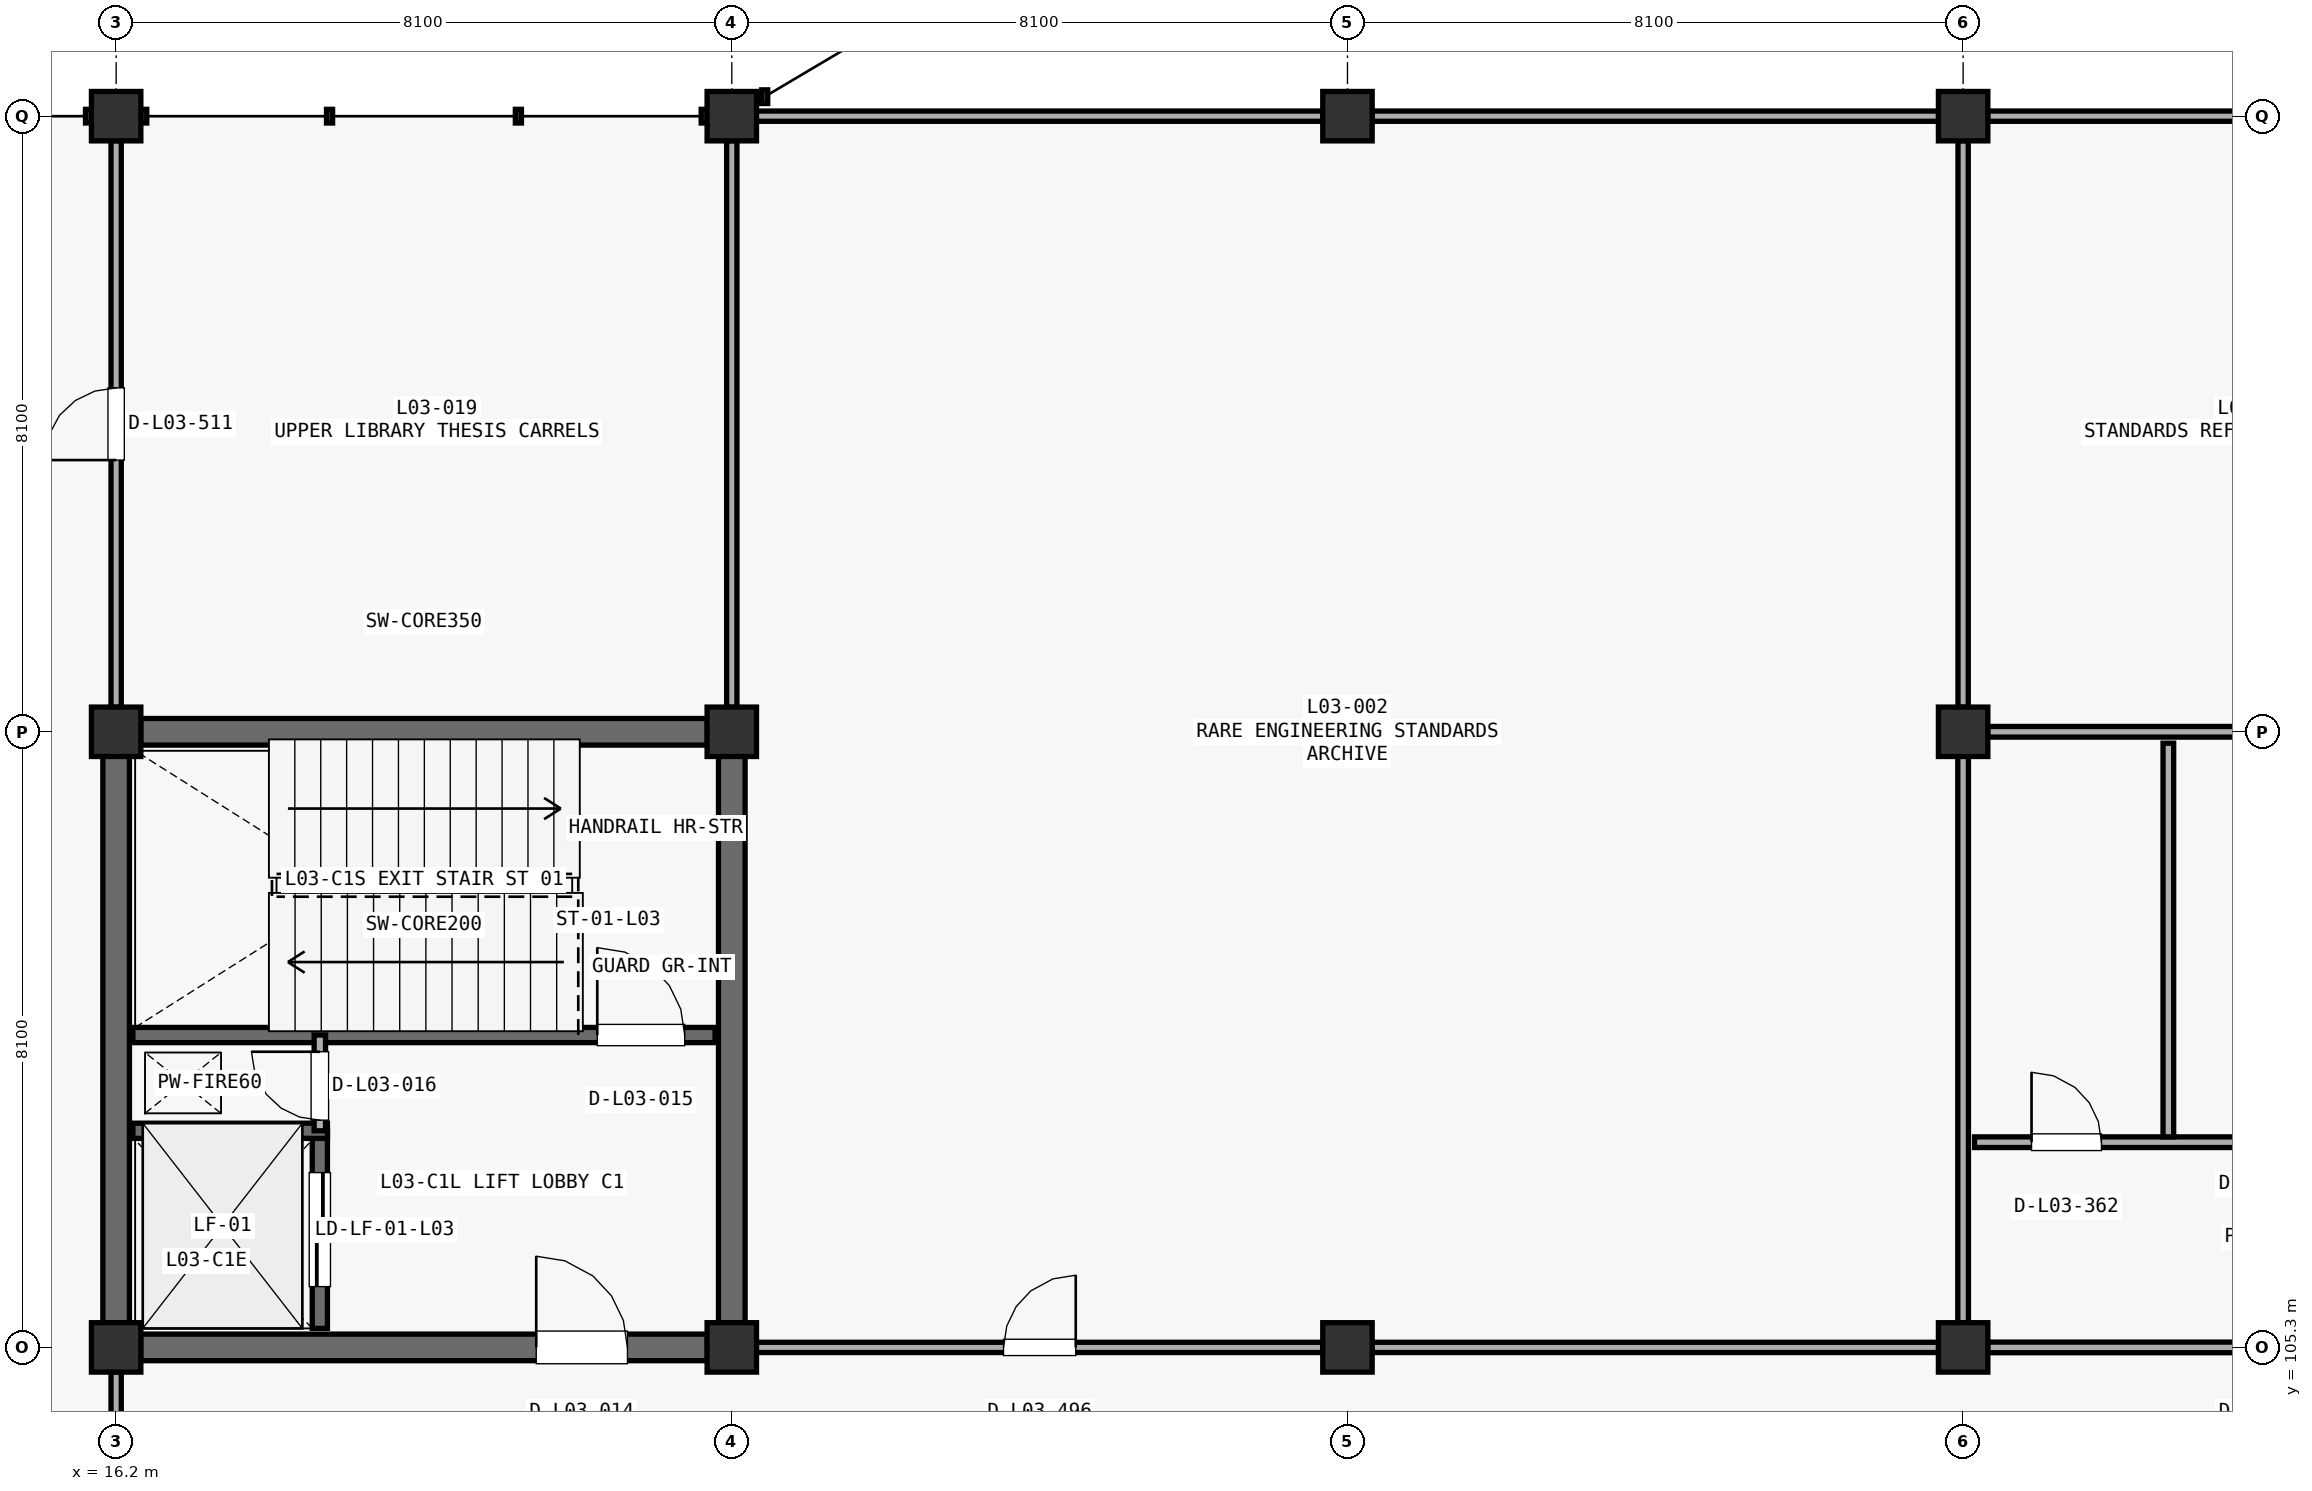
"""IFC4 building model, lengths in metres.
Left out: names, types, materials, properties, quantities, classifications, styles, units other than length and angle.
Written with IfcOpenShell. Run it as: python <this file> out.ifc"""

import sys

from ifc_helpers import new_model, si_unit, direction, frame, frame_2d, origin, origin_2d, place, context, subcontext, project, spatial, rectangle, extrude, element, fill, save


model = new_model("IFC4")
c1 = context("Model", 3, precision=1e-05, world=origin(), true_north=direction((0.0, 1.0)))
c2 = subcontext(c1, "Body", "Model", "MODEL_VIEW")
j1 = project(units=[si_unit("LENGTHUNIT", "METRE"), si_unit("PLANEANGLEUNIT", "RADIAN")], contexts=[c1])
p1 = place(None, origin())
s1 = spatial("IfcSite", under=j1, at=p1, CompositionType="ELEMENT")
p2 = place(p1, origin())
s2 = spatial("IfcBuilding", under=s1, at=p2, CompositionType="ELEMENT")
p3 = place(p2, frame((0.0, 0.0, 14.11)))
s3 = spatial("IfcBuildingStorey", under=s2, at=p3, CompositionType="ELEMENT", Elevation=14.11)
for number, where, z_axis, x_axis in (
    (1, (16.2, 105.3, 0.0), (0.0, 0.0, 1.0), (1.0, 0.0, 0.0)),
    (2, (16.2, 113.4, 0.0), (0.0, 0.0, 1.0), (1.0, 0.0, 0.0)),
    (3, (16.2, 121.5, 0.0), (0.0, 0.0, 1.0), (1.0, 0.0, 0.0)),
    (4, (24.3, 105.3, 0.0), (0.0, 0.0, 1.0), (1.0, 0.0, 0.0)),
    (5, (24.3, 113.4, 0.0), (0.0, 0.0, 1.0), (1.0, 0.0, 0.0)),
    (6, (24.3, 121.5, 0.0), (0.0, 0.0, 1.0), (1.0, 0.0, 0.0)),
    (7, (32.4, 105.3, 0.0), (0.0, 0.0, 1.0), (1.0, 0.0, 0.0)),
    (8, (32.4, 113.4, 0.0), (0.0, 0.0, 1.0), (1.0, 0.0, 0.0)),
    (9, (32.4, 121.5, 0.0), (0.0, 0.0, 1.0), (1.0, 0.0, 0.0)),
    (10, (40.5, 105.3, 0.0), (0.0, 0.0, 1.0), (1.0, 0.0, 0.0)),
    (11, (40.5, 113.4, 0.0), (0.0, 0.0, 1.0), (1.0, 0.0, 0.0)),
    (12, (40.5, 121.5, 0.0), (0.0, 0.0, 1.0), (1.0, 0.0, 0.0)),
):
    element("IfcColumn", number, at=place(p3, frame(where, z_axis=z_axis, x_axis=x_axis)), inside=s3, PredefinedType="COLUMN", context=c2, shape_type="SweptSolid", body=[
        extrude(rectangle(XDim=0.65, YDim=0.65, at=origin_2d()), origin(), (0.0, 0.0, 1.0), 4.42),
    ])
p4 = place(p3, frame((16.523, 113.4, 0.0), z_axis=(0.0, 0.0, 1.0), x_axis=(1.0, 0.0, 0.0)))
e13 = element("IfcWall", 13, at=p4, inside=s3, PredefinedType="SHEAR", context=c2, shape_type="SweptSolid", body=[
    extrude(rectangle(XDim=7.454, YDim=0.35, at=frame_2d((3.727, 0.0))), origin(), (0.0, 0.0, 1.0), 4.162),
])
for number, where, z_axis, x_axis in (
    (14, (16.2, 105.623, 0.0), (0.0, 0.0, 1.0), (0.0, 1.0, 0.0)),
    (15, (24.3, 105.623, 0.0), (0.0, 0.0, 1.0), (0.0, 1.0, 0.0)),
):
    element("IfcWall", number, at=place(p3, frame(where, z_axis=z_axis, x_axis=x_axis)), inside=s3, PredefinedType="SHEAR", context=c2, shape_type="SweptSolid", body=[
        extrude(rectangle(XDim=7.454, YDim=0.35, at=frame_2d((3.727, 0.0))), origin(), (0.0, 0.0, 1.0), 4.162),
    ])
p5 = place(p3, frame((16.523, 105.3, 0.0), z_axis=(0.0, 0.0, 1.0), x_axis=(1.0, 0.0, 0.0)))
e16 = element("IfcWall", 16, at=p5, inside=s3, PredefinedType="SHEAR", context=c2, shape_type="SweptSolid", body=[
    extrude(rectangle(XDim=7.454, YDim=0.35, at=frame_2d((3.727, 0.0))), origin(), (0.0, 0.0, 1.0), 4.162),
])
p6 = place(p5, frame((5.204, 0.0, 0.0)))
e17 = element("IfcOpeningElement", 17, at=p6, cuts=e16, PredefinedType="OPENING", context=c2, shape_type="SweptSolid", body=[
    extrude(rectangle(XDim=1.2, YDim=2.2, at=frame_2d((0.6, 1.1))), frame((0.0, 0.185, 0.0), z_axis=(0.0, -1.0, 0.0), x_axis=(1.0, 0.0, 0.0)), (0.0, 0.0, 1.0), 0.37),
])
p7 = place(p3, frame((16.42, 109.41, 0.0), z_axis=(0.0, 0.0, 1.0), x_axis=(1.0, 0.0, 0.0)))
e18 = element("IfcWall", 18, at=p7, inside=s3, PredefinedType="SHEAR", context=c2, shape_type="SweptSolid", body=[
    extrude(rectangle(XDim=7.66, YDim=0.2, at=frame_2d((3.83, 0.0))), origin(), (0.0, 0.0, 1.0), 4.162),
])
p8 = place(p7, frame((6.11, 0.0, 0.0)))
e19 = element("IfcOpeningElement", 19, at=p8, cuts=e18, PredefinedType="OPENING", context=c2, shape_type="SweptSolid", body=[
    extrude(rectangle(XDim=1.15, YDim=2.2, at=frame_2d((0.575, 1.1))), frame((0.0, 0.11, 0.0), z_axis=(0.0, -1.0, 0.0), x_axis=(1.0, 0.0, 0.0)), (0.0, 0.0, 1.0), 0.22),
])
p9 = place(p3, frame((18.88, 105.55, 0.0), z_axis=(0.0, 0.0, 1.0), x_axis=(0.0, 1.0, 0.0)))
e20 = element("IfcWall", 20, at=p9, inside=s3, PredefinedType="SHEAR", context=c2, shape_type="SweptSolid", body=[
    extrude(rectangle(XDim=2.6, YDim=0.2, at=frame_2d((1.3, 0.0))), origin(), (0.0, 0.0, 1.0), 4.162),
])
p10 = place(p9, frame((0.55, 0.0, 0.0)))
e21 = element("IfcOpeningElement", 21, at=p10, cuts=e20, PredefinedType="OPENING", context=c2, shape_type="SweptSolid", body=[
    extrude(rectangle(XDim=1.5, YDim=2.3, at=frame_2d((0.75, 1.15))), frame((0.0, 0.11, 0.0), z_axis=(0.0, -1.0, 0.0), x_axis=(1.0, 0.0, 0.0)), (0.0, 0.0, 1.0), 0.22),
])
p11 = place(p3, frame((16.42, 108.15, 0.0), z_axis=(0.0, 0.0, 1.0), x_axis=(1.0, 0.0, 0.0)))
e22 = element("IfcWall", 22, at=p11, inside=s3, PredefinedType="SHEAR", context=c2, shape_type="SweptSolid", body=[
    extrude(rectangle(XDim=2.56, YDim=0.2, at=frame_2d((1.28, 0.0))), origin(), (0.0, 0.0, 1.0), 4.162),
])
p12 = place(p3, frame((18.88, 108.15, 0.0), z_axis=(0.0, 0.0, 1.0), x_axis=(0.0, 1.0, 0.0)))
e23 = element("IfcWall", 23, at=p12, inside=s3, PredefinedType="PARTITIONING", context=c2, shape_type="SweptSolid", body=[
    extrude(rectangle(XDim=1.26, YDim=0.15, at=frame_2d((0.63, 0.0))), origin(), (0.0, 0.0, 1.0), 4.162),
])
p13 = place(p12, frame((0.14, 0.0, 0.0)))
e24 = element("IfcOpeningElement", 24, at=p13, cuts=e23, PredefinedType="OPENING", context=c2, shape_type="SweptSolid", body=[
    extrude(rectangle(XDim=0.9, YDim=2.15, at=frame_2d((0.45, 1.075))), frame((0.0, 0.085, 0.0), z_axis=(0.0, -1.0, 0.0), x_axis=(1.0, 0.0, 0.0)), (0.0, 0.0, 1.0), 0.17),
])
p14 = place(p3, frame((40.823, 105.3, 0.0), z_axis=(0.0, 0.0, 1.0), x_axis=(1.0, 0.0, 0.0)))
e25 = element("IfcWall", 25, at=p14, inside=s3, PredefinedType="PARTITIONING", context=c2, shape_type="SweptSolid", body=[
    extrude(rectangle(XDim=7.454, YDim=0.14, at=frame_2d((3.727, 0.0))), origin(), (0.0, 0.0, 1.0), 3.56),
])
p15 = place(p14, frame((3.267, 0.0, 0.0)))
e26 = element("IfcOpeningElement", 26, at=p15, cuts=e25, PredefinedType="OPENING", context=c2, shape_type="SweptSolid", body=[
    extrude(rectangle(XDim=0.92, YDim=2.15, at=frame_2d((0.46, 1.075))), frame((0.0, 0.08, 0.0), z_axis=(0.0, -1.0, 0.0), x_axis=(1.0, 0.0, 0.0)), (0.0, 0.0, 1.0), 0.16),
])
p16 = place(p3, frame((40.823, 113.4, 0.0), z_axis=(0.0, 0.0, 1.0), x_axis=(1.0, 0.0, 0.0)))
e27 = element("IfcWall", 27, at=p16, inside=s3, PredefinedType="PARTITIONING", context=c2, shape_type="SweptSolid", body=[
    extrude(rectangle(XDim=7.454, YDim=0.14, at=frame_2d((3.727, 0.0))), origin(), (0.0, 0.0, 1.0), 3.31),
])
p17 = place(p3, frame((40.5, 105.623, 0.0), z_axis=(0.0, 0.0, 1.0), x_axis=(0.0, 1.0, 0.0)))
e28 = element("IfcWall", 28, at=p17, inside=s3, PredefinedType="PARTITIONING", context=c2, shape_type="SweptSolid", body=[
    extrude(rectangle(XDim=7.454, YDim=0.14, at=frame_2d((3.727, 0.0))), origin(), (0.0, 0.0, 1.0), 3.56),
])
p18 = place(p3, frame((40.65, 108.0, 0.0), z_axis=(0.0, 0.0, 1.0), x_axis=(1.0, 0.0, 0.0)))
e29 = element("IfcWall", 29, at=p18, inside=s3, PredefinedType="PARTITIONING", context=c2, shape_type="SweptSolid", body=[
    extrude(rectangle(XDim=7.8, YDim=0.14, at=frame_2d((3.9, 0.0))), origin(), (0.0, 0.0, 1.0), 4.162),
])
p19 = place(p18, frame((0.75, 0.0, 0.0)))
e30 = element("IfcOpeningElement", 30, at=p19, cuts=e29, PredefinedType="OPENING", context=c2, shape_type="SweptSolid", body=[
    extrude(rectangle(XDim=0.92, YDim=2.15, at=frame_2d((0.46, 1.075))), frame((0.0, 0.08, 0.0), z_axis=(0.0, -1.0, 0.0), x_axis=(1.0, 0.0, 0.0)), (0.0, 0.0, 1.0), 0.16),
])
p20 = place(p18, frame((3.44, 0.0, 0.0)))
e31 = element("IfcOpeningElement", 31, at=p20, cuts=e29, PredefinedType="OPENING", context=c2, shape_type="SweptSolid", body=[
    extrude(rectangle(XDim=0.92, YDim=2.15, at=frame_2d((0.46, 1.075))), frame((0.0, 0.08, 0.0), z_axis=(0.0, -1.0, 0.0), x_axis=(1.0, 0.0, 0.0)), (0.0, 0.0, 1.0), 0.16),
])
p21 = place(p18, frame((6.05, 0.0, 0.0)))
e32 = element("IfcOpeningElement", 32, at=p21, cuts=e29, PredefinedType="OPENING", context=c2, shape_type="SweptSolid", body=[
    extrude(rectangle(XDim=1.0, YDim=2.15, at=frame_2d((0.5, 1.075))), frame((0.0, 0.08, 0.0), z_axis=(0.0, -1.0, 0.0), x_axis=(1.0, 0.0, 0.0)), (0.0, 0.0, 1.0), 0.16),
])
p22 = place(p3, frame((43.2, 108.07, 0.0), z_axis=(0.0, 0.0, 1.0), x_axis=(0.0, 1.0, 0.0)))
e33 = element("IfcWall", 33, at=p22, inside=s3, PredefinedType="PARTITIONING", context=c2, shape_type="SweptSolid", body=[
    extrude(rectangle(XDim=5.18, YDim=0.14, at=frame_2d((2.59, 0.0))), origin(), (0.0, 0.0, 1.0), 4.162),
])
p23 = place(p3, frame((16.2, 97.523, 0.0), z_axis=(0.0, 0.0, 1.0), x_axis=(0.0, 1.0, 0.0)))
e34 = element("IfcWall", 34, at=p23, inside=s3, PredefinedType="PARTITIONING", context=c2, shape_type="SweptSolid", body=[
    extrude(rectangle(XDim=7.454, YDim=0.135, at=frame_2d((3.727, 0.0))), origin(), (0.0, 0.0, 1.0), 3.412),
])
p24 = place(p23, frame((3.252, 0.0, 0.0)))
e35 = element("IfcOpeningElement", 35, at=p24, cuts=e34, PredefinedType="OPENING", context=c2, shape_type="SweptSolid", body=[
    extrude(rectangle(XDim=0.95, YDim=2.15, at=frame_2d((0.475, 1.075))), frame((0.0, 0.078, 0.0), z_axis=(0.0, -1.0, 0.0), x_axis=(1.0, 0.0, 0.0)), (0.0, 0.0, 1.0), 0.155),
])
p25 = place(p3, frame((16.2, 113.723, 0.0), z_axis=(0.0, 0.0, 1.0), x_axis=(0.0, 1.0, 0.0)))
e36 = element("IfcWall", 36, at=p25, inside=s3, PredefinedType="PARTITIONING", context=c2, shape_type="SweptSolid", body=[
    extrude(rectangle(XDim=7.454, YDim=0.135, at=frame_2d((3.727, 0.0))), origin(), (0.0, 0.0, 1.0), 3.562),
])
p26 = place(p25, frame((3.252, 0.0, 0.0)))
e37 = element("IfcOpeningElement", 37, at=p26, cuts=e36, PredefinedType="OPENING", context=c2, shape_type="SweptSolid", body=[
    extrude(rectangle(XDim=0.95, YDim=2.15, at=frame_2d((0.475, 1.075))), frame((0.0, 0.078, 0.0), z_axis=(0.0, -1.0, 0.0), x_axis=(1.0, 0.0, 0.0)), (0.0, 0.0, 1.0), 0.155),
])
p27 = place(p3, frame((24.623, 105.3, 0.0), z_axis=(0.0, 0.0, 1.0), x_axis=(1.0, 0.0, 0.0)))
e38 = element("IfcWall", 38, at=p27, inside=s3, PredefinedType="PARTITIONING", context=c2, shape_type="SweptSolid", body=[
    extrude(rectangle(XDim=7.454, YDim=0.135, at=frame_2d((3.727, 0.0))), origin(), (0.0, 0.0, 1.0), 3.412),
])
p28 = place(p27, frame((3.252, 0.0, 0.0)))
e39 = element("IfcOpeningElement", 39, at=p28, cuts=e38, PredefinedType="OPENING", context=c2, shape_type="SweptSolid", body=[
    extrude(rectangle(XDim=0.95, YDim=2.15, at=frame_2d((0.475, 1.075))), frame((0.0, 0.078, 0.0), z_axis=(0.0, -1.0, 0.0), x_axis=(1.0, 0.0, 0.0)), (0.0, 0.0, 1.0), 0.155),
])
p29 = place(p3, frame((32.723, 105.3, 0.0), z_axis=(0.0, 0.0, 1.0), x_axis=(1.0, 0.0, 0.0)))
e40 = element("IfcWall", 40, at=p29, inside=s3, PredefinedType="PARTITIONING", context=c2, shape_type="SweptSolid", body=[
    extrude(rectangle(XDim=7.454, YDim=0.135, at=frame_2d((3.727, 0.0))), origin(), (0.0, 0.0, 1.0), 3.512),
])
p30 = place(p3, frame((40.5, 113.723, 0.0), z_axis=(0.0, 0.0, 1.0), x_axis=(0.0, 1.0, 0.0)))
e41 = element("IfcWall", 41, at=p30, inside=s3, PredefinedType="PARTITIONING", context=c2, shape_type="SweptSolid", body=[
    extrude(rectangle(XDim=7.454, YDim=0.135, at=frame_2d((3.727, 0.0))), origin(), (0.0, 0.0, 1.0), 3.312),
])
p31 = place(p3, frame((24.3, 113.723, 0.0), z_axis=(0.0, 0.0, 1.0), x_axis=(0.0, 1.0, 0.0)))
e42 = element("IfcWall", 42, at=p31, inside=s3, PredefinedType="PARTITIONING", context=c2, shape_type="SweptSolid", body=[
    extrude(rectangle(XDim=7.454, YDim=0.135, at=frame_2d((3.727, 0.0))), origin(), (0.0, 0.0, 1.0), 3.212),
])
p32 = place(p3, frame((24.623, 121.5, 0.0), z_axis=(0.0, 0.0, 1.0), x_axis=(1.0, 0.0, 0.0)))
e43 = element("IfcWall", 43, at=p32, inside=s3, PredefinedType="PARTITIONING", context=c2, shape_type="SweptSolid", body=[
    extrude(rectangle(XDim=7.454, YDim=0.135, at=frame_2d((3.727, 0.0))), origin(), (0.0, 0.0, 1.0), 3.747),
])
p33 = place(p3, frame((32.723, 121.5, 0.0), z_axis=(0.0, 0.0, 1.0), x_axis=(1.0, 0.0, 0.0)))
e44 = element("IfcWall", 44, at=p33, inside=s3, PredefinedType="PARTITIONING", context=c2, shape_type="SweptSolid", body=[
    extrude(rectangle(XDim=7.454, YDim=0.135, at=frame_2d((3.727, 0.0))), origin(), (0.0, 0.0, 1.0), 3.312),
])
p34 = place(p3, frame((40.823, 121.5, 0.0), z_axis=(0.0, 0.0, 1.0), x_axis=(1.0, 0.0, 0.0)))
e45 = element("IfcWall", 45, at=p34, inside=s3, PredefinedType="PARTITIONING", context=c2, shape_type="SweptSolid", body=[
    extrude(rectangle(XDim=7.454, YDim=0.135, at=frame_2d((3.727, 0.0))), origin(), (0.0, 0.0, 1.0), 3.212),
])
p35 = place(p6, origin())
e46 = element("IfcDoor", 46, at=p35, inside=s3, OperationType="SINGLE_SWING_LEFT", PredefinedType="DOOR", context=c2, shape_type="SweptSolid", body=[
    extrude(rectangle(XDim=1.2, YDim=2.2, at=frame_2d((0.6, 1.1))), frame((0.0, 0.025, 0.0), z_axis=(0.0, -1.0, 0.0), x_axis=(1.0, 0.0, 0.0)), (0.0, 0.0, 1.0), 0.05),
])
fill(e17, e46)
p36 = place(p8, origin())
e47 = element("IfcDoor", 47, at=p36, inside=s3, OperationType="SINGLE_SWING_LEFT", PredefinedType="DOOR", context=c2, shape_type="SweptSolid", body=[
    extrude(rectangle(XDim=1.15, YDim=2.2, at=frame_2d((0.575, 1.1))), frame((0.0, 0.025, 0.0), z_axis=(0.0, -1.0, 0.0), x_axis=(1.0, 0.0, 0.0)), (0.0, 0.0, 1.0), 0.05),
])
fill(e19, e47)
p37 = place(p10, origin())
e48 = element("IfcDoor", 48, at=p37, inside=s3, OperationType="SLIDING_TO_LEFT", PredefinedType="DOOR", context=c2, shape_type="SweptSolid", body=[
    extrude(rectangle(XDim=1.5, YDim=2.3, at=frame_2d((0.75, 1.15))), frame((0.0, 0.025, 0.0), z_axis=(0.0, -1.0, 0.0), x_axis=(1.0, 0.0, 0.0)), (0.0, 0.0, 1.0), 0.05),
])
fill(e21, e48)
p38 = place(p13, origin())
e49 = element("IfcDoor", 49, at=p38, inside=s3, OperationType="SINGLE_SWING_RIGHT", PredefinedType="DOOR", context=c2, shape_type="SweptSolid", body=[
    extrude(rectangle(XDim=0.9, YDim=2.15, at=frame_2d((0.45, 1.075))), frame((0.0, 0.025, 0.0), z_axis=(0.0, -1.0, 0.0), x_axis=(1.0, 0.0, 0.0)), (0.0, 0.0, 1.0), 0.05),
])
fill(e24, e49)
p39 = place(p19, origin())
e50 = element("IfcDoor", 50, at=p39, inside=s3, OperationType="SINGLE_SWING_LEFT", PredefinedType="DOOR", context=c2, shape_type="SweptSolid", body=[
    extrude(rectangle(XDim=0.92, YDim=2.15, at=frame_2d((0.46, 1.075))), frame((0.0, 0.025, 0.0), z_axis=(0.0, -1.0, 0.0), x_axis=(1.0, 0.0, 0.0)), (0.0, 0.0, 1.0), 0.05),
])
fill(e30, e50)
p40 = place(p28, origin())
e51 = element("IfcDoor", 51, at=p40, inside=s3, OperationType="SINGLE_SWING_RIGHT", PredefinedType="DOOR", context=c2, shape_type="SweptSolid", body=[
    extrude(rectangle(XDim=0.95, YDim=2.15, at=frame_2d((0.475, 1.075))), frame((0.0, 0.025, 0.0), z_axis=(0.0, -1.0, 0.0), x_axis=(1.0, 0.0, 0.0)), (0.0, 0.0, 1.0), 0.05),
])
fill(e39, e51)
p41 = place(p26, origin())
e52 = element("IfcDoor", 52, at=p41, inside=s3, OperationType="SINGLE_SWING_LEFT", PredefinedType="DOOR", context=c2, shape_type="SweptSolid", body=[
    extrude(rectangle(XDim=0.95, YDim=2.15, at=frame_2d((0.475, 1.075))), frame((0.0, 0.025, 0.0), z_axis=(0.0, -1.0, 0.0), x_axis=(1.0, 0.0, 0.0)), (0.0, 0.0, 1.0), 0.05),
])
fill(e37, e52)
save(model, sys.argv[1])
